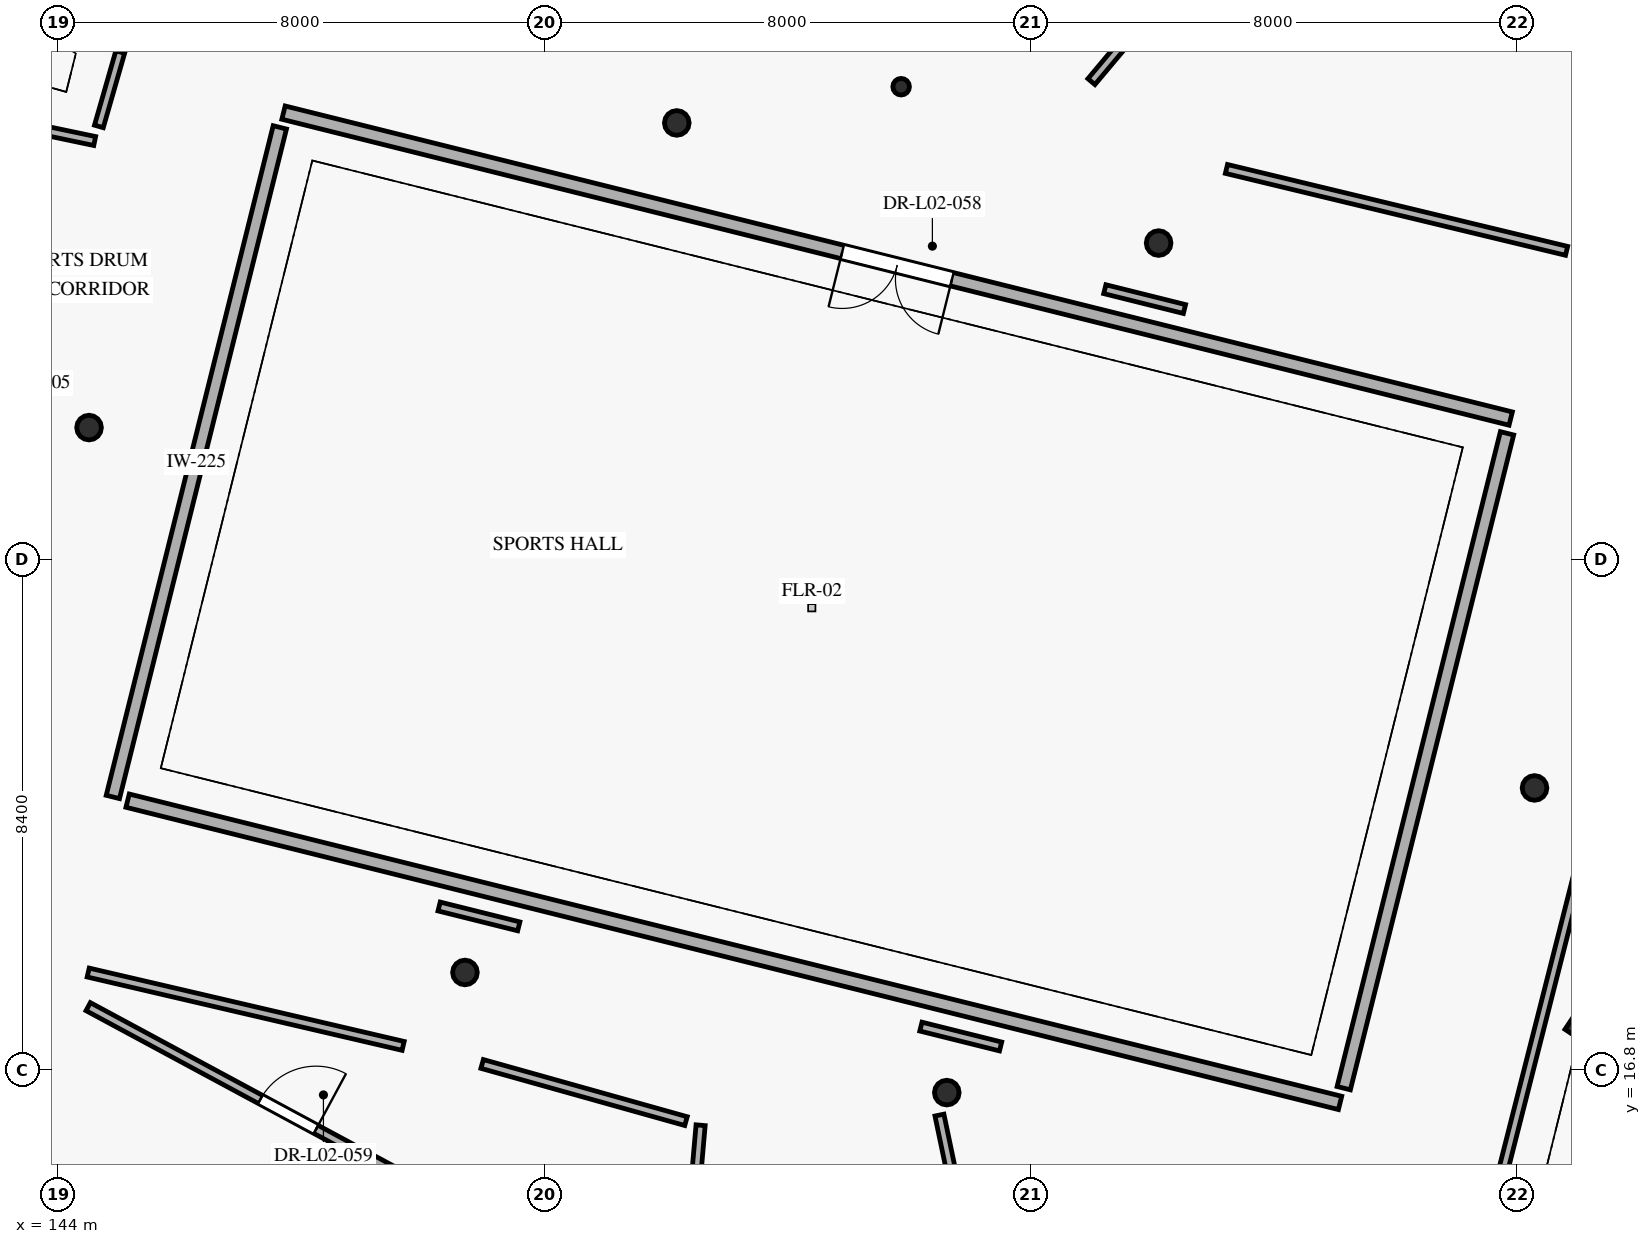
"""IFC4 building model, lengths in metres.
Left out: names, types, materials, properties, quantities, classifications, styles, units other than length and angle.
Written with IfcOpenShell. Run it as: python <this file> out.ifc"""

import sys

from ifc_helpers import new_model, si_unit, direction, frame, frame_2d, origin, origin_2d, place, context, subcontext, project, spatial, rectangle, hollow_circle, i_section, extrude, element, fill, save


model = new_model("IFC4")
c1 = context("Model", 3, precision=1e-05, world=origin(), true_north=direction((0.0, 1.0)))
c2 = subcontext(c1, "Body", "Model", "MODEL_VIEW")
j1 = project(units=[si_unit("LENGTHUNIT", "METRE"), si_unit("PLANEANGLEUNIT", "RADIAN")], contexts=[c1])
p1 = place(None, origin())
s1 = spatial("IfcSite", under=j1, at=p1, CompositionType="ELEMENT")
p2 = place(p1, origin())
s2 = spatial("IfcBuilding", under=s1, at=p2, CompositionType="ELEMENT")
p3 = place(p2, frame((0.0, 0.0, 8.4)))
s3 = spatial("IfcBuildingStorey", under=s2, at=p3, CompositionType="ELEMENT", Elevation=8.4)
for number, where, z_axis, x_axis in (
    (1, (144.514, 27.364, 0.0), (0.0, 0.0, 1.0), (0.97, -0.242, 0.0)),
    (2, (150.696, 18.402, 0.0), (0.0, 0.0, 1.0), (0.97, -0.242, 0.0)),
    (3, (154.18, 32.374, 0.0), (0.0, 0.0, 1.0), (0.97, -0.242, 0.0)),
    (4, (158.62, 16.426, 0.0), (0.0, 0.0, 1.0), (0.97, -0.242, 0.0)),
    (5, (162.104, 30.398, 0.0), (0.0, 0.0, 1.0), (0.97, -0.242, 0.0)),
    (6, (168.286, 21.437, 0.0), (0.0, 0.0, 1.0), (0.97, -0.242, 0.0)),
):
    element("IfcColumn", number, at=place(p3, frame(where, z_axis=z_axis, x_axis=x_axis)), inside=s3, PredefinedType="COLUMN", context=c2, shape_type="SweptSolid", body=[
        extrude(hollow_circle(Radius=0.203, WallThickness=0.016, at=origin_2d()), origin(), (0.0, 0.0, 1.0), 4.2),
    ])
p4 = place(p3, frame((157.869, 32.97, 0.0), z_axis=(0.0, 0.0, 1.0), x_axis=(0.965925826289, 0.258819045103, 0.0)))
e7 = element("IfcColumn", 7, at=p4, inside=s3, PredefinedType="COLUMN", context=c2, shape_type="SweptSolid", body=[
    extrude(hollow_circle(Radius=0.136, WallThickness=0.012, at=origin_2d()), origin(), (0.0, 0.0, 1.0), 4.2),
])
p5 = place(p3, frame((168.97, 17.5, 0.0), z_axis=(0.0, 0.0, 1.0), x_axis=(0.55557023302, 0.831469612303, 0.0)))
e8 = element("IfcColumn", 8, at=p5, inside=s3, PredefinedType="COLUMN", context=c2, shape_type="SweptSolid", body=[
    extrude(i_section(OverallWidth=0.259, OverallDepth=0.267, WebThickness=0.013, FlangeThickness=0.021, FilletRadius=0.013, at=origin_2d()), origin(), (0.0, 0.0, 1.0), 4.2),
])
p6 = place(p3, frame((167.894, 27.512, 0.0), z_axis=(0.0, 0.0, 1.0), x_axis=(-0.970295584886, 0.241922462682, 0.0)))
e9 = element("IfcWall", 9, at=p6, inside=s3, PredefinedType="PARTITIONING", context=c2, shape_type="SweptSolid", body=[
    extrude(rectangle(XDim=20.8, YDim=0.225, at=frame_2d((10.4, 0.0))), origin(), (0.0, 0.0, 1.0), 3.95),
])
p7 = place(p6, frame((9.47, 0.0, 0.0)))
e10 = element("IfcOpeningElement", 10, at=p7, cuts=e9, PredefinedType="OPENING", context=c2, shape_type="SweptSolid", body=[
    extrude(rectangle(XDim=1.86, YDim=2.2, at=frame_2d((0.93, 1.1))), frame((0.0, 0.123, 0.0), z_axis=(0.0, -1.0, 0.0), x_axis=(1.0, 0.0, 0.0)), (0.0, 0.0, 1.0), 0.245),
])
p8 = place(p3, frame((147.652, 32.301, 0.0), z_axis=(0.0, 0.0, 1.0), x_axis=(-0.241928223143, -0.97029414862, 0.0)))
e11 = element("IfcWall", 11, at=p8, inside=s3, PredefinedType="PARTITIONING", context=c2, shape_type="SweptSolid", body=[
    extrude(rectangle(XDim=11.35, YDim=0.225, at=frame_2d((5.675, 0.0))), origin(), (0.0, 0.0, 1.0), 3.95),
])
p9 = place(p3, frame((145.148, 21.228, 0.0), z_axis=(0.0, 0.0, 1.0), x_axis=(0.970296746874, -0.241917802169, 0.0)))
e12 = element("IfcWall", 12, at=p9, inside=s3, PredefinedType="PARTITIONING", context=c2, shape_type="SweptSolid", body=[
    extrude(rectangle(XDim=20.55, YDim=0.225, at=frame_2d((10.275, 0.0))), origin(), (0.0, 0.0, 1.0), 3.95),
])
p10 = place(p3, frame((165.148, 16.499, 0.0), z_axis=(0.0, 0.0, 1.0), x_axis=(0.241919724519, 0.970296267585, 0.0)))
e13 = element("IfcWall", 13, at=p10, inside=s3, PredefinedType="PARTITIONING", context=c2, shape_type="SweptSolid", body=[
    extrude(rectangle(XDim=11.1, YDim=0.225, at=frame_2d((5.55, 0.0))), origin(), (0.0, 0.0, 1.0), 3.95),
])
p11 = place(p3, frame((154.302, 12.805, 0.0), z_axis=(0.0, 0.0, 1.0), x_axis=(0.08712978082, 0.996196969125, 0.0)))
e14 = element("IfcWall", 14, at=p11, inside=s3, PredefinedType="PARTITIONING", context=c2, shape_type="SweptSolid", body=[
    extrude(rectangle(XDim=3.096, YDim=0.15, at=frame_2d((1.548, 0.0))), origin(), (0.0, 0.0, 1.0), 3.915),
])
p12 = place(p3, frame((154.331, 15.957, 0.0), z_axis=(0.0, 0.0, 1.0), x_axis=(-0.96284886492, 0.270040854913, 0.0)))
e15 = element("IfcWall", 15, at=p12, inside=s3, PredefinedType="PARTITIONING", context=c2, shape_type="SweptSolid", body=[
    extrude(rectangle(XDim=3.482, YDim=0.15, at=frame_2d((1.741, 0.0))), origin(), (0.0, 0.0, 1.0), 3.915),
])
p13 = place(p3, frame((151.581, 19.16, 0.0), z_axis=(0.0, 0.0, 1.0), x_axis=(-0.970301811202, 0.241897488986, 0.0)))
e16 = element("IfcWall", 16, at=p13, inside=s3, PredefinedType="PARTITIONING", context=c2, shape_type="SweptSolid", body=[
    extrude(rectangle(XDim=1.35, YDim=0.15, at=frame_2d((0.675, 0.0))), origin(), (0.0, 0.0, 1.0), 3.915),
])
p14 = place(p3, frame((149.679, 17.194, 0.0), z_axis=(0.0, 0.0, 1.0), x_axis=(-0.973924106984, 0.226874048396, 0.0)))
e17 = element("IfcWall", 17, at=p14, inside=s3, PredefinedType="PARTITIONING", context=c2, shape_type="SweptSolid", body=[
    extrude(rectangle(XDim=5.318, YDim=0.15, at=frame_2d((2.659, 0.0))), origin(), (0.0, 0.0, 1.0), 3.915),
])
p15 = place(p3, frame((144.5, 17.84, 0.0), z_axis=(0.0, 0.0, 1.0), x_axis=(0.880350401945, -0.474323908101, 0.0)))
e18 = element("IfcWall", 18, at=p15, inside=s3, PredefinedType="PARTITIONING", context=c2, shape_type="SweptSolid", body=[
    extrude(rectangle(XDim=7.471, YDim=0.15, at=frame_2d((3.735, 0.0))), origin(), (0.0, 0.0, 1.0), 3.915),
])
p16 = place(p15, frame((3.216, 0.0, 0.0)))
e19 = element("IfcOpeningElement", 19, at=p16, cuts=e18, PredefinedType="OPENING", context=c2, shape_type="SweptSolid", body=[
    extrude(rectangle(XDim=1.04, YDim=2.1, at=frame_2d((0.52, 1.05))), frame((0.0, 0.085, 0.0), z_axis=(0.0, -1.0, 0.0), x_axis=(1.0, 0.0, 0.0)), (0.0, 0.0, 1.0), 0.17),
])
p17 = place(p3, frame((169.053, 42.652, 0.0), z_axis=(0.0, 0.0, 1.0), x_axis=(-0.642787139762, -0.766044837432, 0.0)))
e20 = element("IfcWall", 20, at=p17, inside=s3, PredefinedType="PARTITIONING", context=c2, shape_type="SweptSolid", body=[
    extrude(rectangle(XDim=12.53, YDim=0.15, at=frame_2d((6.265, 0.0))), origin(), (0.0, 0.0, 1.0), 3.915),
])
p18 = place(p17, frame((4.092, 0.0, 0.0)))
e21 = element("IfcOpeningElement", 21, at=p18, cuts=e20, PredefinedType="OPENING", context=c2, shape_type="SweptSolid", body=[
    extrude(rectangle(XDim=0.84, YDim=2.04, at=frame_2d((0.42, 1.02))), frame((0.0, 0.085, 0.0), z_axis=(0.0, -1.0, 0.0), x_axis=(1.0, 0.0, 0.0)), (0.0, 0.0, 1.0), 0.17),
])
p19 = place(p3, frame((161.219, 29.64, 0.0), z_axis=(0.0, 0.0, 1.0), x_axis=(0.970301811202, -0.241897488986, 0.0)))
e22 = element("IfcWall", 22, at=p19, inside=s3, PredefinedType="PARTITIONING", context=c2, shape_type="SweptSolid", body=[
    extrude(rectangle(XDim=1.35, YDim=0.15, at=frame_2d((0.675, 0.0))), origin(), (0.0, 0.0, 1.0), 3.915),
])
p20 = place(p3, frame((163.219, 31.617, 0.0), z_axis=(0.0, 0.0, 1.0), x_axis=(0.972202891844, -0.23413999464, 0.0)))
e23 = element("IfcWall", 23, at=p20, inside=s3, PredefinedType="PARTITIONING", context=c2, shape_type="SweptSolid", body=[
    extrude(rectangle(XDim=5.754, YDim=0.15, at=frame_2d((2.877, 0.0))), origin(), (0.0, 0.0, 1.0), 3.915),
])
p21 = place(p3, frame((158.499, 16.056, 0.0), z_axis=(0.0, 0.0, 1.0), x_axis=(0.205069487246, -0.978747416549, 0.0)))
e24 = element("IfcWall", 24, at=p21, inside=s3, PredefinedType="PARTITIONING", context=c2, shape_type="SweptSolid", body=[
    extrude(rectangle(XDim=3.322, YDim=0.15, at=frame_2d((1.661, 0.0))), origin(), (0.0, 0.0, 1.0), 3.915),
])
p22 = place(p3, frame((169.034, 20.123, 0.0), z_axis=(0.0, 0.0, 1.0), x_axis=(-0.246255844253, -0.969204859238, 0.0)))
e25 = element("IfcWall", 25, at=p22, inside=s3, PredefinedType="PARTITIONING", context=c2, shape_type="SweptSolid", body=[
    extrude(rectangle(XDim=5.139, YDim=0.15, at=frame_2d((2.57, 0.0))), origin(), (0.0, 0.0, 1.0), 3.915),
])
p23 = place(p3, frame((159.505, 17.185, 0.0), z_axis=(0.0, 0.0, 1.0), x_axis=(-0.970322957749, 0.241812649929, 0.0)))
e26 = element("IfcWall", 26, at=p23, inside=s3, PredefinedType="PARTITIONING", context=c2, shape_type="SweptSolid", body=[
    extrude(rectangle(XDim=1.351, YDim=0.15, at=frame_2d((0.675, 0.0))), origin(), (0.0, 0.0, 1.0), 3.915),
])
p24 = place(p3, frame((143.376, 32.334, 0.0), z_axis=(0.0, 0.0, 1.0), x_axis=(0.978708141887, -0.205256846424, 0.0)))
e27 = element("IfcWall", 27, at=p24, inside=s3, PredefinedType="PARTITIONING", context=c2, shape_type="SweptSolid", body=[
    extrude(rectangle(XDim=1.257, YDim=0.15, at=frame_2d((0.629, 0.0))), origin(), (0.0, 0.0, 1.0), 3.915),
])
p25 = place(p3, frame((144.676, 32.316, 0.0), z_axis=(0.0, 0.0, 1.0), x_axis=(0.275986551493, 0.961161497041, 0.0)))
e28 = element("IfcWall", 28, at=p25, inside=s3, PredefinedType="PARTITIONING", context=c2, shape_type="SweptSolid", body=[
    extrude(rectangle(XDim=1.274, YDim=0.15, at=frame_2d((0.637, 0.0))), origin(), (0.0, 0.0, 1.0), 3.915),
])
p26 = place(p7, frame((1.86, 0.0, 0.0), z_axis=(0.0, 0.0, 1.0), x_axis=(-1.0, 0.0, 0.0)))
e29 = element("IfcDoor", 29, at=p26, inside=s3, OperationType="DOUBLE_DOOR_SINGLE_SWING", PredefinedType="DOOR", context=c2, shape_type="SweptSolid", body=[
    extrude(rectangle(XDim=1.86, YDim=2.2, at=frame_2d((0.93, 1.1))), frame((0.0, 0.025, 0.0), z_axis=(0.0, -1.0, 0.0), x_axis=(1.0, 0.0, 0.0)), (0.0, 0.0, 1.0), 0.05),
])
fill(e10, e29)
p27 = place(p16, origin())
e30 = element("IfcDoor", 30, at=p27, inside=s3, OperationType="SINGLE_SWING_RIGHT", PredefinedType="DOOR", context=c2, shape_type="SweptSolid", body=[
    extrude(rectangle(XDim=1.04, YDim=2.1, at=frame_2d((0.52, 1.05))), frame((0.0, 0.025, 0.0), z_axis=(0.0, -1.0, 0.0), x_axis=(1.0, 0.0, 0.0)), (0.0, 0.0, 1.0), 0.05),
])
fill(e19, e30)
save(model, sys.argv[1])
